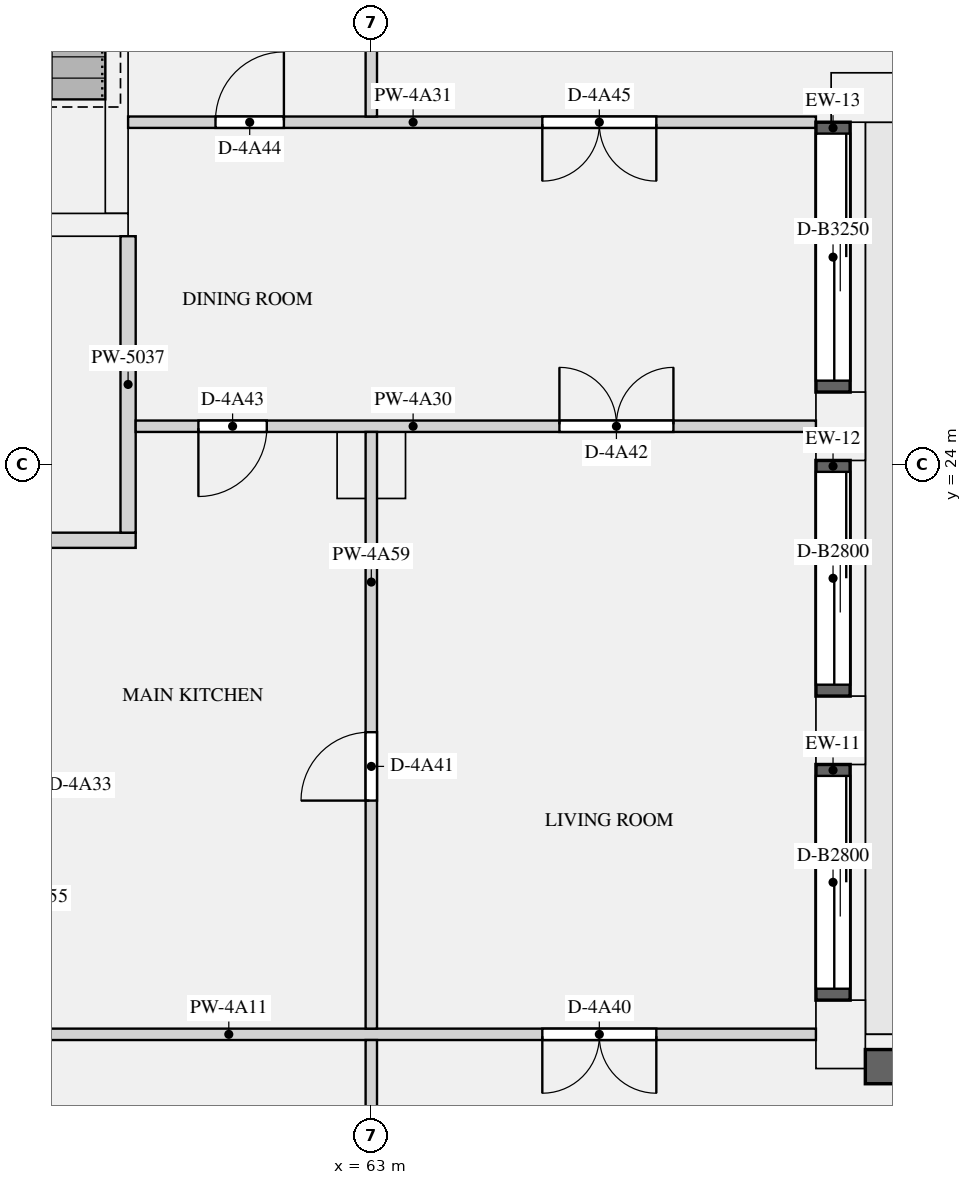
"""IFC4 building model, lengths in metres.
Left out: names, types, materials, properties, quantities, classifications, styles, units other than length and angle.
Written with IfcOpenShell. Run it as: python <this file> out.ifc"""

import sys

from ifc_helpers import new_model, si_unit, direction, frame, frame_2d, origin, origin_2d, place, context, subcontext, project, spatial, rectangle, extrude, element, fill, save


model = new_model("IFC4")
c1 = context("Model", 3, precision=1e-05, world=origin(), true_north=direction((0.0, 1.0)))
c2 = subcontext(c1, "Body", "Model", "MODEL_VIEW")
j1 = project(units=[si_unit("LENGTHUNIT", "METRE"), si_unit("PLANEANGLEUNIT", "RADIAN")], contexts=[c1])
p1 = place(None, origin())
s1 = spatial("IfcSite", under=j1, at=p1, CompositionType="ELEMENT")
p2 = place(p1, origin())
s2 = spatial("IfcBuilding", under=s1, at=p2, CompositionType="ELEMENT")
p3 = place(p2, frame((0.0, 0.0, 198.0)))
s3 = spatial("IfcBuildingStorey", under=s2, at=p3, CompositionType="ELEMENT", Elevation=198.0)
for number, where, z_axis, x_axis in (
    (1, (69.175, 16.5, 0.0), (0.0, 0.0, 1.0), (0.0, 1.0, 0.0)),
    (2, (69.175, 20.5, 0.0), (0.0, 0.0, 1.0), (0.0, 1.0, 0.0)),
    (3, (69.175, 24.5, 0.0), (0.0, 0.0, 1.0), (0.0, 1.0, 0.0)),
    (4, (69.5, 28.825, 0.0), (0.0, 0.0, 1.0), (1.0, 0.0, 0.0)),
):
    element("IfcColumn", number, at=place(p3, frame(where, z_axis=z_axis, x_axis=x_axis)), inside=s3, PredefinedType="USERDEFINED", context=c2, shape_type="SweptSolid", body=[
        extrude(rectangle(XDim=0.9, YDim=0.65, at=origin_2d()), origin(), (0.0, 0.0, 1.0), 3.15),
    ])
p4 = place(p3, frame((63.0, 24.0, 0.0), z_axis=(0.0, 0.0, 1.0), x_axis=(1.0, 0.0, 0.0)))
e5 = element("IfcColumn", 5, at=p4, inside=s3, PredefinedType="COLUMN", context=c2, shape_type="SweptSolid", body=[
    extrude(rectangle(XDim=0.9, YDim=0.9, at=origin_2d()), origin(), (0.0, 0.0, 1.0), 3.15),
])
p5 = place(p3, frame((56.2, 27.15, 0.0), z_axis=(0.0, 0.0, 1.0), x_axis=(1.0, 0.0, 0.0)))
e6 = element("IfcWall", 6, at=p5, inside=s3, PredefinedType="SHEAR", context=c2, shape_type="SweptSolid", body=[
    extrude(rectangle(XDim=3.6, YDim=0.3, at=frame_2d((1.8, 0.0))), origin(), (0.0, 0.0, 1.0), 3.15),
])
p6 = place(p5, frame((1.25, 0.0, 0.0)))
e7 = element("IfcOpeningElement", 7, at=p6, cuts=e6, PredefinedType="OPENING", context=c2, shape_type="SweptSolid", body=[
    extrude(rectangle(XDim=1.1, YDim=2.1, at=frame_2d((0.55, 1.05))), frame((0.0, 0.16, 0.0), z_axis=(0.0, -1.0, 0.0), x_axis=(1.0, 0.0, 0.0)), (0.0, 0.0, 1.0), 0.32),
])
p7 = place(p3, frame((59.65, 27.3, 0.0), z_axis=(0.0, 0.0, 1.0), x_axis=(0.0, 1.0, 0.0)))
e8 = element("IfcWall", 8, at=p7, inside=s3, PredefinedType="SHEAR", context=c2, shape_type="SweptSolid", body=[
    extrude(rectangle(XDim=7.8, YDim=0.3, at=frame_2d((3.9, 0.0))), origin(), (0.0, 0.0, 1.0), 3.15),
])
p8 = place(p3, frame((71.1, 16.075, 0.9), z_axis=(0.0, 0.0, 1.0), x_axis=(-1.0, 0.0, 0.0)))
e9 = element("IfcWall", 9, at=p8, inside=s3, PredefinedType="SOLIDWALL", context=c2, shape_type="SweptSolid", body=[
    extrude(rectangle(XDim=1.6, YDim=0.45, at=frame_2d((0.8, 0.0))), origin(), (0.0, 0.0, 1.0), 1.93),
])
p9 = place(p3, frame((69.075, 16.95, 0.0), z_axis=(0.0, 0.0, 1.0), x_axis=(0.0, 1.0, 0.0)))
e10 = element("IfcWall", 10, at=p9, inside=s3, PredefinedType="SOLIDWALL", context=c2, shape_type="SweptSolid", body=[
    extrude(rectangle(XDim=3.1, YDim=0.45, at=frame_2d((1.55, 0.0))), origin(), (0.0, 0.0, 1.0), 2.83),
])
p10 = place(p9, frame((0.15, 0.0, 0.0)))
e11 = element("IfcOpeningElement", 11, at=p10, cuts=e10, PredefinedType="OPENING", context=c2, shape_type="SweptSolid", body=[
    extrude(rectangle(XDim=2.8, YDim=2.3, at=frame_2d((1.4, 1.15))), frame((0.0, 0.235, 0.0), z_axis=(0.0, -1.0, 0.0), x_axis=(1.0, 0.0, 0.0)), (0.0, 0.0, 1.0), 0.47),
])
p11 = place(p3, frame((69.075, 20.95, 0.0), z_axis=(0.0, 0.0, 1.0), x_axis=(0.0, 1.0, 0.0)))
e12 = element("IfcWall", 12, at=p11, inside=s3, PredefinedType="SOLIDWALL", context=c2, shape_type="SweptSolid", body=[
    extrude(rectangle(XDim=3.1, YDim=0.45, at=frame_2d((1.55, 0.0))), origin(), (0.0, 0.0, 1.0), 2.83),
])
p12 = place(p11, frame((0.15, 0.0, 0.0)))
e13 = element("IfcOpeningElement", 13, at=p12, cuts=e12, PredefinedType="OPENING", context=c2, shape_type="SweptSolid", body=[
    extrude(rectangle(XDim=2.8, YDim=2.3, at=frame_2d((1.4, 1.15))), frame((0.0, 0.235, 0.0), z_axis=(0.0, -1.0, 0.0), x_axis=(1.0, 0.0, 0.0)), (0.0, 0.0, 1.0), 0.47),
])
p13 = place(p3, frame((69.075, 24.95, 0.0), z_axis=(0.0, 0.0, 1.0), x_axis=(0.0, 1.0, 0.0)))
e14 = element("IfcWall", 14, at=p13, inside=s3, PredefinedType="SOLIDWALL", context=c2, shape_type="SweptSolid", body=[
    extrude(rectangle(XDim=3.55, YDim=0.45, at=frame_2d((1.775, 0.0))), origin(), (0.0, 0.0, 1.0), 2.83),
])
p14 = place(p13, frame((0.15, 0.0, 0.0)))
e15 = element("IfcOpeningElement", 15, at=p14, cuts=e14, PredefinedType="OPENING", context=c2, shape_type="SweptSolid", body=[
    extrude(rectangle(XDim=3.25, YDim=2.3, at=frame_2d((1.625, 1.15))), frame((0.0, 0.235, 0.0), z_axis=(0.0, -1.0, 0.0), x_axis=(1.0, 0.0, 0.0)), (0.0, 0.0, 1.0), 0.47),
])
p15 = place(p3, frame((54.9, 23.0, 0.0), z_axis=(0.0, 0.0, 1.0), x_axis=(1.0, 0.0, 0.0)))
e16 = element("IfcWall", 16, at=p15, inside=s3, PredefinedType="PARTITIONING", context=c2, shape_type="SweptSolid", body=[
    extrude(rectangle(XDim=5.0, YDim=0.2, at=frame_2d((2.5, 0.0))), origin(), (0.0, 0.0, 1.0), 2.83),
])
p16 = place(p3, frame((59.8, 23.1, 0.0), z_axis=(0.0, 0.0, 1.0), x_axis=(0.0, 1.0, 0.0)))
e17 = element("IfcWall", 17, at=p16, inside=s3, PredefinedType="PARTITIONING", context=c2, shape_type="SweptSolid", body=[
    extrude(rectangle(XDim=3.9, YDim=0.2, at=frame_2d((1.95, 0.0))), origin(), (0.0, 0.0, 1.0), 2.83),
])
p17 = place(p3, frame((54.1, 16.5, 0.0), z_axis=(0.0, 0.0, 1.0), x_axis=(1.0, 0.0, 0.0)))
e18 = element("IfcWall", 18, at=p17, inside=s3, PredefinedType="PARTITIONING", context=c2, shape_type="SweptSolid", body=[
    extrude(rectangle(XDim=14.75, YDim=0.15, at=frame_2d((7.375, 0.0))), origin(), (0.0, 0.0, 1.0), 2.83),
])
p18 = place(p17, frame((1.4, 0.0, 0.0)))
e19 = element("IfcOpeningElement", 19, at=p18, cuts=e18, PredefinedType="OPENING", context=c2, shape_type="SweptSolid", body=[
    extrude(rectangle(XDim=1.5, YDim=2.1, at=frame_2d((0.75, 1.05))), frame((0.0, 0.085, 0.0), z_axis=(0.0, -1.0, 0.0), x_axis=(1.0, 0.0, 0.0)), (0.0, 0.0, 1.0), 0.17),
])
p19 = place(p17, frame((11.15, 0.0, 0.0)))
e20 = element("IfcOpeningElement", 20, at=p19, cuts=e18, PredefinedType="OPENING", context=c2, shape_type="SweptSolid", body=[
    extrude(rectangle(XDim=1.5, YDim=2.1, at=frame_2d((0.75, 1.05))), frame((0.0, 0.085, 0.0), z_axis=(0.0, -1.0, 0.0), x_axis=(1.0, 0.0, 0.0)), (0.0, 0.0, 1.0), 0.17),
])
p20 = place(p3, frame((59.9, 24.5, 0.0), z_axis=(0.0, 0.0, 1.0), x_axis=(1.0, 0.0, 0.0)))
e21 = element("IfcWall", 21, at=p20, inside=s3, PredefinedType="PARTITIONING", context=c2, shape_type="SweptSolid", body=[
    extrude(rectangle(XDim=8.95, YDim=0.15, at=frame_2d((4.475, 0.0))), origin(), (0.0, 0.0, 1.0), 2.83),
])
p21 = place(p20, frame((5.575, 0.0, 0.0)))
e22 = element("IfcOpeningElement", 22, at=p21, cuts=e21, PredefinedType="OPENING", context=c2, shape_type="SweptSolid", body=[
    extrude(rectangle(XDim=1.5, YDim=2.1, at=frame_2d((0.75, 1.05))), frame((0.0, 0.085, 0.0), z_axis=(0.0, -1.0, 0.0), x_axis=(1.0, 0.0, 0.0)), (0.0, 0.0, 1.0), 0.17),
])
p22 = place(p20, frame((0.825, 0.0, 0.0)))
e23 = element("IfcOpeningElement", 23, at=p22, cuts=e21, PredefinedType="OPENING", context=c2, shape_type="SweptSolid", body=[
    extrude(rectangle(XDim=0.9, YDim=2.1, at=frame_2d((0.45, 1.05))), frame((0.0, 0.085, 0.0), z_axis=(0.0, -1.0, 0.0), x_axis=(1.0, 0.0, 0.0)), (0.0, 0.0, 1.0), 0.17),
])
p23 = place(p3, frame((59.8, 28.5, 0.0), z_axis=(0.0, 0.0, 1.0), x_axis=(1.0, 0.0, 0.0)))
e24 = element("IfcWall", 24, at=p23, inside=s3, PredefinedType="PARTITIONING", context=c2, shape_type="SweptSolid", body=[
    extrude(rectangle(XDim=9.05, YDim=0.15, at=frame_2d((4.525, 0.0))), origin(), (0.0, 0.0, 1.0), 2.83),
])
p24 = place(p23, frame((1.15, 0.0, 0.0)))
e25 = element("IfcOpeningElement", 25, at=p24, cuts=e24, PredefinedType="OPENING", context=c2, shape_type="SweptSolid", body=[
    extrude(rectangle(XDim=0.9, YDim=2.1, at=frame_2d((0.45, 1.05))), frame((0.0, 0.085, 0.0), z_axis=(0.0, -1.0, 0.0), x_axis=(1.0, 0.0, 0.0)), (0.0, 0.0, 1.0), 0.17),
])
p25 = place(p23, frame((5.45, 0.0, 0.0)))
e26 = element("IfcOpeningElement", 26, at=p25, cuts=e24, PredefinedType="OPENING", context=c2, shape_type="SweptSolid", body=[
    extrude(rectangle(XDim=1.5, YDim=2.1, at=frame_2d((0.75, 1.05))), frame((0.0, 0.085, 0.0), z_axis=(0.0, -1.0, 0.0), x_axis=(1.0, 0.0, 0.0)), (0.0, 0.0, 1.0), 0.17),
])
p26 = place(p3, frame((63.0, 12.575, 0.0), z_axis=(0.0, 0.0, 1.0), x_axis=(0.0, 1.0, 0.0)))
e27 = element("IfcWall", 27, at=p26, inside=s3, PredefinedType="PARTITIONING", context=c2, shape_type="SweptSolid", body=[
    extrude(rectangle(XDim=3.85, YDim=0.15, at=frame_2d((1.925, 0.0))), origin(), (0.0, 0.0, 1.0), 2.83),
])
p27 = place(p3, frame((63.0, 16.575, 0.0), z_axis=(0.0, 0.0, 1.0), x_axis=(0.0, 1.0, 0.0)))
e28 = element("IfcWall", 28, at=p27, inside=s3, PredefinedType="PARTITIONING", context=c2, shape_type="SweptSolid", body=[
    extrude(rectangle(XDim=7.85, YDim=0.15, at=frame_2d((3.925, 0.0))), origin(), (0.0, 0.0, 1.0), 2.83),
])
p28 = place(p27, frame((3.0, 0.0, 0.0)))
e29 = element("IfcOpeningElement", 29, at=p28, cuts=e28, PredefinedType="OPENING", context=c2, shape_type="SweptSolid", body=[
    extrude(rectangle(XDim=0.9, YDim=2.1, at=frame_2d((0.45, 1.05))), frame((0.0, 0.085, 0.0), z_axis=(0.0, -1.0, 0.0), x_axis=(1.0, 0.0, 0.0)), (0.0, 0.0, 1.0), 0.17),
])
p29 = place(p3, frame((63.0, 28.575, 0.0), z_axis=(0.0, 0.0, 1.0), x_axis=(0.0, 1.0, 0.0)))
e30 = element("IfcWall", 30, at=p29, inside=s3, PredefinedType="PARTITIONING", context=c2, shape_type="SweptSolid", body=[
    extrude(rectangle(XDim=6.75, YDim=0.15, at=frame_2d((3.375, 0.0))), origin(), (0.0, 0.0, 1.0), 2.83),
])
p30 = place(p10, origin())
e31 = element("IfcDoor", 31, at=p30, inside=s3, OperationType="SLIDING_TO_LEFT", PredefinedType="DOOR", context=c2, shape_type="SweptSolid", body=[
    extrude(rectangle(XDim=2.8, YDim=2.3, at=frame_2d((1.4, 1.15))), frame((0.0, -0.07, 0.0), z_axis=(0.0, -1.0, 0.0), x_axis=(1.0, 0.0, 0.0)), (0.0, 0.0, 1.0), 0.05),
])
fill(e11, e31)
p31 = place(p12, origin())
e32 = element("IfcDoor", 32, at=p31, inside=s3, OperationType="SLIDING_TO_LEFT", PredefinedType="DOOR", context=c2, shape_type="SweptSolid", body=[
    extrude(rectangle(XDim=2.8, YDim=2.3, at=frame_2d((1.4, 1.15))), frame((0.0, -0.07, 0.0), z_axis=(0.0, -1.0, 0.0), x_axis=(1.0, 0.0, 0.0)), (0.0, 0.0, 1.0), 0.05),
])
fill(e13, e32)
p32 = place(p14, origin())
e33 = element("IfcDoor", 33, at=p32, inside=s3, OperationType="SLIDING_TO_LEFT", PredefinedType="DOOR", context=c2, shape_type="SweptSolid", body=[
    extrude(rectangle(XDim=3.25, YDim=2.3, at=frame_2d((1.625, 1.15))), frame((0.0, -0.07, 0.0), z_axis=(0.0, -1.0, 0.0), x_axis=(1.0, 0.0, 0.0)), (0.0, 0.0, 1.0), 0.05),
])
fill(e15, e33)
p33 = place(p19, frame((1.5, 0.0, 0.0), z_axis=(0.0, 0.0, 1.0), x_axis=(-1.0, 0.0, 0.0)))
e34 = element("IfcDoor", 34, at=p33, inside=s3, OperationType="DOUBLE_DOOR_SINGLE_SWING", PredefinedType="DOOR", context=c2, shape_type="SweptSolid", body=[
    extrude(rectangle(XDim=1.5, YDim=2.1, at=frame_2d((0.75, 1.05))), frame((0.0, 0.025, 0.0), z_axis=(0.0, -1.0, 0.0), x_axis=(1.0, 0.0, 0.0)), (0.0, 0.0, 1.0), 0.05),
])
fill(e20, e34)
p34 = place(p28, origin())
e35 = element("IfcDoor", 35, at=p34, inside=s3, OperationType="SINGLE_SWING_LEFT", PredefinedType="DOOR", context=c2, shape_type="SweptSolid", body=[
    extrude(rectangle(XDim=0.9, YDim=2.1, at=frame_2d((0.45, 1.05))), frame((0.0, 0.025, 0.0), z_axis=(0.0, -1.0, 0.0), x_axis=(1.0, 0.0, 0.0)), (0.0, 0.0, 1.0), 0.05),
])
fill(e29, e35)
p35 = place(p21, origin())
e36 = element("IfcDoor", 36, at=p35, inside=s3, OperationType="DOUBLE_DOOR_SINGLE_SWING", PredefinedType="DOOR", context=c2, shape_type="SweptSolid", body=[
    extrude(rectangle(XDim=1.5, YDim=2.1, at=frame_2d((0.75, 1.05))), frame((0.0, 0.025, 0.0), z_axis=(0.0, -1.0, 0.0), x_axis=(1.0, 0.0, 0.0)), (0.0, 0.0, 1.0), 0.05),
])
fill(e22, e36)
p36 = place(p22, frame((0.9, 0.0, 0.0), z_axis=(0.0, 0.0, 1.0), x_axis=(-1.0, 0.0, 0.0)))
e37 = element("IfcDoor", 37, at=p36, inside=s3, OperationType="SINGLE_SWING_RIGHT", PredefinedType="DOOR", context=c2, shape_type="SweptSolid", body=[
    extrude(rectangle(XDim=0.9, YDim=2.1, at=frame_2d((0.45, 1.05))), frame((0.0, 0.025, 0.0), z_axis=(0.0, -1.0, 0.0), x_axis=(1.0, 0.0, 0.0)), (0.0, 0.0, 1.0), 0.05),
])
fill(e23, e37)
p37 = place(p24, origin())
e38 = element("IfcDoor", 38, at=p37, inside=s3, OperationType="SINGLE_SWING_RIGHT", PredefinedType="DOOR", context=c2, shape_type="SweptSolid", body=[
    extrude(rectangle(XDim=0.9, YDim=2.1, at=frame_2d((0.45, 1.05))), frame((0.0, 0.025, 0.0), z_axis=(0.0, -1.0, 0.0), x_axis=(1.0, 0.0, 0.0)), (0.0, 0.0, 1.0), 0.05),
])
fill(e25, e38)
p38 = place(p25, frame((1.5, 0.0, 0.0), z_axis=(0.0, 0.0, 1.0), x_axis=(-1.0, 0.0, 0.0)))
e39 = element("IfcDoor", 39, at=p38, inside=s3, OperationType="DOUBLE_DOOR_SINGLE_SWING", PredefinedType="DOOR", context=c2, shape_type="SweptSolid", body=[
    extrude(rectangle(XDim=1.5, YDim=2.1, at=frame_2d((0.75, 1.05))), frame((0.0, 0.025, 0.0), z_axis=(0.0, -1.0, 0.0), x_axis=(1.0, 0.0, 0.0)), (0.0, 0.0, 1.0), 0.05),
])
fill(e26, e39)
save(model, sys.argv[1])
